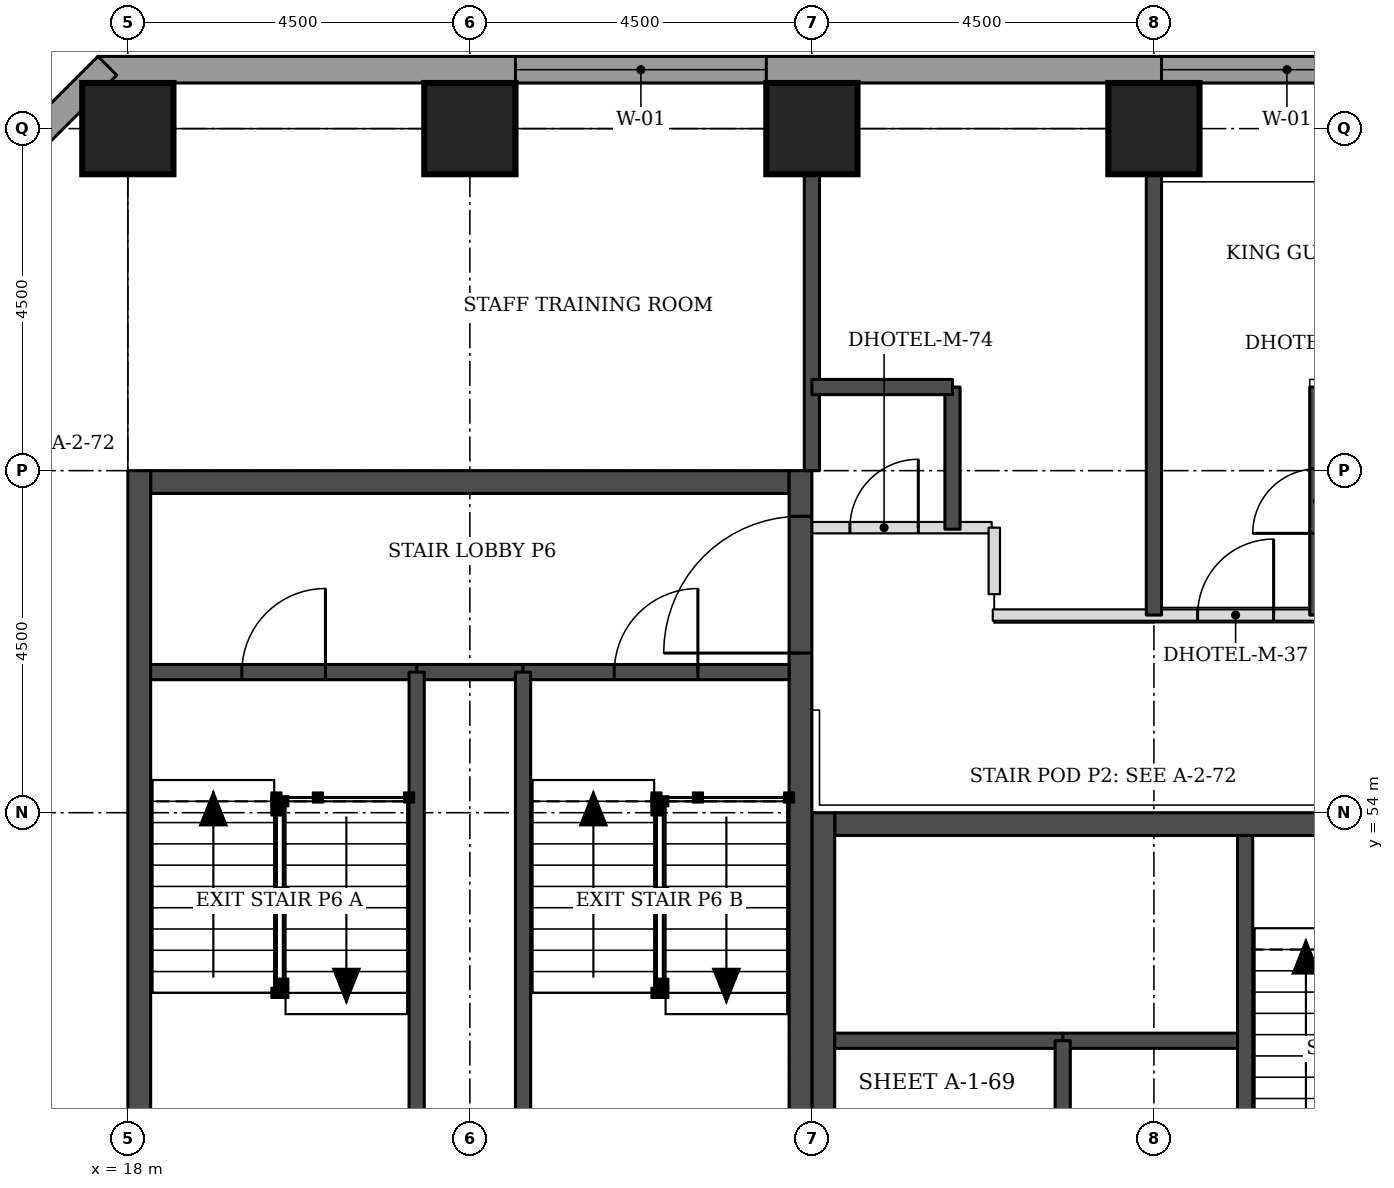
"""IFC4 building model, lengths in metres.
Left out: names, types, materials, properties, quantities, classifications, styles, units other than length and angle.
Written with IfcOpenShell. Run it as: python <this file> out.ifc"""

import sys

from ifc_helpers import new_model, si_unit, direction, frame, frame_2d, origin, origin_2d, place, context, subcontext, project, spatial, rectangle, extrude, element, fill, save


model = new_model("IFC4")
c1 = context("Model", 3, precision=1e-05, world=origin(), true_north=direction((0.0, 1.0)))
c2 = subcontext(c1, "Body", "Model", "MODEL_VIEW")
j1 = project(units=[si_unit("LENGTHUNIT", "METRE"), si_unit("PLANEANGLEUNIT", "RADIAN")], contexts=[c1])
p1 = place(None, origin())
s1 = spatial("IfcSite", under=j1, at=p1, CompositionType="ELEMENT")
p2 = place(p1, origin())
s2 = spatial("IfcBuilding", under=s1, at=p2, CompositionType="ELEMENT")
p3 = place(p2, frame((0.0, 0.0, 23.1)))
s3 = spatial("IfcBuildingStorey", under=s2, at=p3, CompositionType="ELEMENT", Elevation=23.1)
for number, where, z_axis, x_axis in (
    (1, (18.0, 63.0, 0.0), (0.0, 0.0, 1.0), (1.0, 0.0, 0.0)),
    (2, (22.5, 63.0, 0.0), (0.0, 0.0, 1.0), (1.0, 0.0, 0.0)),
    (3, (27.0, 63.0, 0.0), (0.0, 0.0, 1.0), (1.0, 0.0, 0.0)),
    (4, (31.5, 63.0, 0.0), (0.0, 0.0, 1.0), (1.0, 0.0, 0.0)),
):
    element("IfcColumn", number, at=place(p3, frame(where, z_axis=z_axis, x_axis=x_axis)), inside=s3, PredefinedType="COLUMN", context=c2, shape_type="SweptSolid", body=[
        extrude(rectangle(XDim=1.2, YDim=1.2, at=origin_2d()), origin(), (0.0, 0.0, 1.0), 3.3),
    ])
p4 = place(p3, frame((27.3, 53.85, 0.0), z_axis=(0.0, 0.0, 1.0), x_axis=(1.0, 0.0, 0.0)))
e5 = element("IfcWall", 5, at=p4, inside=s3, PredefinedType="SHEAR", context=c2, shape_type="SweptSolid", body=[
    extrude(rectangle(XDim=8.4, YDim=0.3, at=frame_2d((4.2, 0.0))), origin(), (0.0, 0.0, 1.0), 3.3),
])
p5 = place(p4, frame((6.4, 0.0, 0.0)))
e6 = element("IfcOpeningElement", 6, at=p5, cuts=e5, PredefinedType="OPENING", context=c2, shape_type="SweptSolid", body=[
    extrude(rectangle(XDim=1.1, YDim=2.1, at=frame_2d((0.55, 1.05))), frame((0.0, 0.16, 0.0), z_axis=(0.0, -1.0, 0.0), x_axis=(1.0, 0.0, 0.0)), (0.0, 0.0, 1.0), 0.32),
])
p6 = place(p3, frame((27.15, 45.0, 0.0), z_axis=(0.0, 0.0, 1.0), x_axis=(0.0, 1.0, 0.0)))
e7 = element("IfcWall", 7, at=p6, inside=s3, PredefinedType="SHEAR", context=c2, shape_type="SweptSolid", body=[
    extrude(rectangle(XDim=9.0, YDim=0.3, at=frame_2d((4.5, 0.0))), origin(), (0.0, 0.0, 1.0), 3.3),
])
p7 = place(p6, frame((0.4, 0.0, 0.0)))
e8 = element("IfcOpeningElement", 8, at=p7, cuts=e7, PredefinedType="OPENING", context=c2, shape_type="SweptSolid", body=[
    extrude(rectangle(XDim=1.1, YDim=2.1, at=frame_2d((0.55, 1.05))), frame((0.0, 0.16, 0.0), z_axis=(0.0, -1.0, 0.0), x_axis=(1.0, 0.0, 0.0)), (0.0, 0.0, 1.0), 0.32),
])
p8 = place(p3, frame((18.3, 58.35, 0.0), z_axis=(0.0, 0.0, 1.0), x_axis=(1.0, 0.0, 0.0)))
e9 = element("IfcWall", 9, at=p8, inside=s3, PredefinedType="SHEAR", context=c2, shape_type="SweptSolid", body=[
    extrude(rectangle(XDim=8.4, YDim=0.3, at=frame_2d((4.2, 0.0))), origin(), (0.0, 0.0, 1.0), 3.3),
])
p9 = place(p3, frame((18.15, 49.5, 0.0), z_axis=(0.0, 0.0, 1.0), x_axis=(0.0, 1.0, 0.0)))
e10 = element("IfcWall", 10, at=p9, inside=s3, PredefinedType="SHEAR", context=c2, shape_type="SweptSolid", body=[
    extrude(rectangle(XDim=9.0, YDim=0.3, at=frame_2d((4.5, 0.0))), origin(), (0.0, 0.0, 1.0), 3.3),
])
p10 = place(p3, frame((26.85, 49.5, 0.0), z_axis=(0.0, 0.0, 1.0), x_axis=(0.0, 1.0, 0.0)))
e11 = element("IfcWall", 11, at=p10, inside=s3, PredefinedType="SHEAR", context=c2, shape_type="SweptSolid", body=[
    extrude(rectangle(XDim=9.0, YDim=0.3, at=frame_2d((4.5, 0.0))), origin(), (0.0, 0.0, 1.0), 3.3),
])
p11 = place(p10, frame((6.6, 0.0, 0.0)))
e12 = element("IfcOpeningElement", 12, at=p11, cuts=e11, PredefinedType="OPENING", context=c2, shape_type="SweptSolid", body=[
    extrude(rectangle(XDim=1.8, YDim=2.1, at=frame_2d((0.9, 1.05))), frame((0.0, 0.16, 0.0), z_axis=(0.0, -1.0, 0.0), x_axis=(1.0, 0.0, 0.0)), (0.0, 0.0, 1.0), 0.32),
])
p12 = place(p3, frame((35.4, 63.775, 0.0), z_axis=(0.0, 0.0, 1.0), x_axis=(-1.0, 0.0, 0.0)))
e13 = element("IfcWall", 13, at=p12, inside=s3, PredefinedType="STANDARD", context=c2, shape_type="SweptSolid", body=[
    extrude(rectangle(XDim=17.793, YDim=0.35, at=frame_2d((8.897, 0.0))), origin(), (0.0, 0.0, 1.0), 3.055),
])
p13 = place(p12, frame((0.5, 0.0, 0.8)))
e14 = element("IfcOpeningElement", 14, at=p13, cuts=e13, PredefinedType="OPENING", context=c2, shape_type="SweptSolid", body=[
    extrude(rectangle(XDim=3.3, YDim=1.5, at=frame_2d((1.65, 0.75))), frame((0.0, 0.185, 0.0), z_axis=(0.0, -1.0, 0.0), x_axis=(1.0, 0.0, 0.0)), (0.0, 0.0, 1.0), 0.37),
])
p14 = place(p12, frame((9.0, 0.0, 0.8)))
e15 = element("IfcOpeningElement", 15, at=p14, cuts=e13, PredefinedType="OPENING", context=c2, shape_type="SweptSolid", body=[
    extrude(rectangle(XDim=3.3, YDim=1.5, at=frame_2d((1.65, 0.75))), frame((0.0, 0.185, 0.0), z_axis=(0.0, -1.0, 0.0), x_axis=(1.0, 0.0, 0.0)), (0.0, 0.0, 1.0), 0.37),
])
p15 = place(p3, frame((17.73, 63.826, 0.0), z_axis=(0.0, 0.0, 1.0), x_axis=(-0.707106781187, -0.707106781187, 0.0)))
e16 = element("IfcWall", 16, at=p15, inside=s3, PredefinedType="STANDARD", context=c2, shape_type="SweptSolid", body=[
    extrude(rectangle(XDim=7.151, YDim=0.35, at=frame_2d((3.576, 0.0))), origin(), (0.0, 0.0, 1.0), 3.055),
])
p16 = place(p15, frame((1.926, 0.0, 0.8)))
e17 = element("IfcOpeningElement", 17, at=p16, cuts=e16, PredefinedType="OPENING", context=c2, shape_type="SweptSolid", body=[
    extrude(rectangle(XDim=3.3, YDim=1.5, at=frame_2d((1.65, 0.75))), frame((0.0, 0.185, 0.0), z_axis=(0.0, -1.0, 0.0), x_axis=(1.0, 0.0, 0.0)), (0.0, 0.0, 1.0), 0.37),
])
p17 = place(p3, frame((29.38, 56.6, 0.0), z_axis=(0.0, 0.0, 1.0), x_axis=(1.0, 0.0, 0.0)))
e18 = element("IfcWall", 18, at=p17, inside=s3, PredefinedType="PARTITIONING", context=c2, shape_type="SweptSolid", body=[
    extrude(rectangle(XDim=13.62, YDim=0.15, at=frame_2d((6.81, 0.0))), origin(), (0.0, 0.0, 1.0), 3.08),
])
p18 = place(p17, frame((2.695, 0.0, 0.0)))
e19 = element("IfcOpeningElement", 19, at=p18, cuts=e18, PredefinedType="OPENING", context=c2, shape_type="SweptSolid", body=[
    extrude(rectangle(XDim=1.0, YDim=2.1, at=frame_2d((0.5, 1.05))), frame((0.0, 0.085, 0.0), z_axis=(0.0, -1.0, 0.0), x_axis=(1.0, 0.0, 0.0)), (0.0, 0.0, 1.0), 0.17),
])
p19 = place(p17, frame((9.67, 0.0, 0.0)))
e20 = element("IfcOpeningElement", 20, at=p19, cuts=e18, PredefinedType="OPENING", context=c2, shape_type="SweptSolid", body=[
    extrude(rectangle(XDim=0.9, YDim=2.1, at=frame_2d((0.45, 1.05))), frame((0.0, 0.085, 0.0), z_axis=(0.0, -1.0, 0.0), x_axis=(1.0, 0.0, 0.0)), (0.0, 0.0, 1.0), 0.17),
])
p20 = place(p3, frame((27.0, 58.5, 0.0), z_axis=(0.0, 0.0, 1.0), x_axis=(0.0, 1.0, 0.0)))
e21 = element("IfcWall", 21, at=p20, inside=s3, PredefinedType="SOLIDWALL", context=c2, shape_type="SweptSolid", body=[
    extrude(rectangle(XDim=3.9, YDim=0.2, at=frame_2d((1.95, 0.0))), origin(), (0.0, 0.0, 1.0), 3.08),
])
p21 = place(p3, frame((28.85, 57.73, 0.0), z_axis=(0.0, 0.0, 1.0), x_axis=(0.0, 1.0, 0.0)))
e22 = element("IfcWall", 22, at=p21, inside=s3, PredefinedType="SOLIDWALL", context=c2, shape_type="SweptSolid", body=[
    extrude(rectangle(XDim=1.87, YDim=0.2, at=frame_2d((0.935, 0.0))), origin(), (0.0, 0.0, 1.0), 3.08),
])
p22 = place(p3, frame((31.5, 56.6, 0.0), z_axis=(0.0, 0.0, 1.0), x_axis=(0.0, 1.0, 0.0)))
e23 = element("IfcWall", 23, at=p22, inside=s3, PredefinedType="SOLIDWALL", context=c2, shape_type="SweptSolid", body=[
    extrude(rectangle(XDim=5.8, YDim=0.2, at=frame_2d((2.9, 0.0))), origin(), (0.0, 0.0, 1.0), 3.08),
])
p23 = place(p3, frame((33.65, 56.6, 0.0), z_axis=(0.0, 0.0, 1.0), x_axis=(0.0, 1.0, 0.0)))
e24 = element("IfcWall", 24, at=p23, inside=s3, PredefinedType="SOLIDWALL", context=c2, shape_type="SweptSolid", body=[
    extrude(rectangle(XDim=3.0, YDim=0.2, at=frame_2d((1.5, 0.0))), origin(), (0.0, 0.0, 1.0), 3.08),
])
p24 = place(p23, frame((1.075, 0.0, 0.0)))
e25 = element("IfcOpeningElement", 25, at=p24, cuts=e24, PredefinedType="OPENING", context=c2, shape_type="SweptSolid", body=[
    extrude(rectangle(XDim=0.85, YDim=2.1, at=frame_2d((0.425, 1.05))), frame((0.0, 0.11, 0.0), z_axis=(0.0, -1.0, 0.0), x_axis=(1.0, 0.0, 0.0)), (0.0, 0.0, 1.0), 0.22),
])
p25 = place(p3, frame((27.0, 59.6, 0.0), z_axis=(0.0, 0.0, 1.0), x_axis=(1.0, 0.0, 0.0)))
e26 = element("IfcWall", 26, at=p25, inside=s3, PredefinedType="SOLIDWALL", context=c2, shape_type="SweptSolid", body=[
    extrude(rectangle(XDim=1.85, YDim=0.2, at=frame_2d((0.925, 0.0))), origin(), (0.0, 0.0, 1.0), 3.08),
])
p26 = place(p3, frame((27.0, 57.75, 0.0), z_axis=(0.0, 0.0, 1.0), x_axis=(1.0, 0.0, 0.0)))
e27 = element("IfcWall", 27, at=p26, inside=s3, PredefinedType="PARTITIONING", context=c2, shape_type="SweptSolid", body=[
    extrude(rectangle(XDim=2.365, YDim=0.15, at=frame_2d((1.183, 0.0))), origin(), (0.0, 0.0, 1.0), 3.08),
])
p27 = place(p26, frame((0.5, 0.0, 0.0)))
e28 = element("IfcOpeningElement", 28, at=p27, cuts=e27, PredefinedType="OPENING", context=c2, shape_type="SweptSolid", body=[
    extrude(rectangle(XDim=0.9, YDim=2.1, at=frame_2d((0.45, 1.05))), frame((0.0, 0.085, 0.0), z_axis=(0.0, -1.0, 0.0), x_axis=(1.0, 0.0, 0.0)), (0.0, 0.0, 1.0), 0.17),
])
p28 = place(p3, frame((29.4, 57.75, 0.0), z_axis=(0.0, 0.0, 1.0), x_axis=(0.0, -1.0, 0.0)))
e29 = element("IfcWall", 29, at=p28, inside=s3, PredefinedType="PARTITIONING", context=c2, shape_type="SweptSolid", body=[
    extrude(rectangle(XDim=0.875, YDim=0.15, at=frame_2d((0.438, 0.0))), origin(), (0.0, 0.0, 1.0), 3.08),
])
p29 = place(p3, frame((30.3, 51.0, 0.0), z_axis=(0.0, 0.0, 1.0), x_axis=(1.0, 0.0, 0.0)))
e30 = element("IfcWall", 30, at=p29, inside=s3, PredefinedType="SOLIDWALL", context=c2, shape_type="SweptSolid", body=[
    extrude(rectangle(XDim=2.4, YDim=0.2, at=frame_2d((1.2, 0.0))), origin(), (0.0, 0.0, 1.0), 3.3),
])
p30 = place(p3, frame((27.3, 51.0, 0.0), z_axis=(0.0, 0.0, 1.0), x_axis=(1.0, 0.0, 0.0)))
e31 = element("IfcWall", 31, at=p30, inside=s3, PredefinedType="SOLIDWALL", context=c2, shape_type="SweptSolid", body=[
    extrude(rectangle(XDim=3.0, YDim=0.2, at=frame_2d((1.5, 0.0))), origin(), (0.0, 0.0, 1.0), 3.08),
])
for number, where, z_axis, x_axis in (
    (32, (30.3, 45.3, 0.0), (0.0, 0.0, 1.0), (0.0, 1.0, 0.0)),
    (33, (32.7, 48.0, 0.0), (0.0, 0.0, 1.0), (0.0, 1.0, 0.0)),
):
    element("IfcWall", number, at=place(p3, frame(where, z_axis=z_axis, x_axis=x_axis)), inside=s3, PredefinedType="SOLIDWALL", context=c2, shape_type="SweptSolid", body=[
        extrude(rectangle(XDim=5.7, YDim=0.2, at=frame_2d((2.85, 0.0))), origin(), (0.0, 0.0, 1.0), 3.08),
    ])
p31 = place(p3, frame((21.8, 55.85, 0.0), z_axis=(0.0, 0.0, 1.0), x_axis=(1.0, 0.0, 0.0)))
e34 = element("IfcWall", 34, at=p31, inside=s3, PredefinedType="SOLIDWALL", context=c2, shape_type="SweptSolid", body=[
    extrude(rectangle(XDim=1.4, YDim=0.2, at=frame_2d((0.7, 0.0))), origin(), (0.0, 0.0, 1.0), 3.08),
])
p32 = place(p3, frame((18.3, 55.85, 0.0), z_axis=(0.0, 0.0, 1.0), x_axis=(1.0, 0.0, 0.0)))
e35 = element("IfcWall", 35, at=p32, inside=s3, PredefinedType="SOLIDWALL", context=c2, shape_type="SweptSolid", body=[
    extrude(rectangle(XDim=3.5, YDim=0.2, at=frame_2d((1.75, 0.0))), origin(), (0.0, 0.0, 1.0), 3.08),
])
p33 = place(p32, frame((1.2, 0.0, 0.0)))
e36 = element("IfcOpeningElement", 36, at=p33, cuts=e35, PredefinedType="OPENING", context=c2, shape_type="SweptSolid", body=[
    extrude(rectangle(XDim=1.1, YDim=2.1, at=frame_2d((0.55, 1.05))), frame((0.0, 0.11, 0.0), z_axis=(0.0, -1.0, 0.0), x_axis=(1.0, 0.0, 0.0)), (0.0, 0.0, 1.0), 0.22),
])
p34 = place(p3, frame((23.2, 55.85, 0.0), z_axis=(0.0, 0.0, 1.0), x_axis=(1.0, 0.0, 0.0)))
e37 = element("IfcWall", 37, at=p34, inside=s3, PredefinedType="SOLIDWALL", context=c2, shape_type="SweptSolid", body=[
    extrude(rectangle(XDim=3.5, YDim=0.2, at=frame_2d((1.75, 0.0))), origin(), (0.0, 0.0, 1.0), 3.08),
])
p35 = place(p34, frame((1.2, 0.0, 0.0)))
e38 = element("IfcOpeningElement", 38, at=p35, cuts=e37, PredefinedType="OPENING", context=c2, shape_type="SweptSolid", body=[
    extrude(rectangle(XDim=1.1, YDim=2.1, at=frame_2d((0.55, 1.05))), frame((0.0, 0.11, 0.0), z_axis=(0.0, -1.0, 0.0), x_axis=(1.0, 0.0, 0.0)), (0.0, 0.0, 1.0), 0.22),
])
for number, where, z_axis, x_axis in (
    (39, (21.8, 49.8, 0.0), (0.0, 0.0, 1.0), (0.0, 1.0, 0.0)),
    (40, (23.2, 49.8, 0.0), (0.0, 0.0, 1.0), (0.0, 1.0, 0.0)),
):
    element("IfcWall", number, at=place(p3, frame(where, z_axis=z_axis, x_axis=x_axis)), inside=s3, PredefinedType="SOLIDWALL", context=c2, shape_type="SweptSolid", body=[
        extrude(rectangle(XDim=6.05, YDim=0.2, at=frame_2d((3.025, 0.0))), origin(), (0.0, 0.0, 1.0), 3.08),
    ])
p36 = place(p13, origin())
e41 = element("IfcWindow", 41, at=p36, inside=s3, PartitioningType="SINGLE_PANEL", PredefinedType="WINDOW", context=c2, shape_type="SweptSolid", body=[
    extrude(rectangle(XDim=3.3, YDim=1.5, at=frame_2d((1.65, 0.75))), frame((0.0, 0.085, 0.0), z_axis=(0.0, -1.0, 0.0), x_axis=(1.0, 0.0, 0.0)), (0.0, 0.0, 1.0), 0.06),
])
fill(e14, e41)
p37 = place(p14, origin())
e42 = element("IfcWindow", 42, at=p37, inside=s3, PartitioningType="SINGLE_PANEL", PredefinedType="WINDOW", context=c2, shape_type="SweptSolid", body=[
    extrude(rectangle(XDim=3.3, YDim=1.5, at=frame_2d((1.65, 0.75))), frame((0.0, 0.085, 0.0), z_axis=(0.0, -1.0, 0.0), x_axis=(1.0, 0.0, 0.0)), (0.0, 0.0, 1.0), 0.06),
])
fill(e15, e42)
p38 = place(p18, origin())
e43 = element("IfcDoor", 43, at=p38, inside=s3, OperationType="SINGLE_SWING_RIGHT", PredefinedType="DOOR", context=c2, shape_type="SweptSolid", body=[
    extrude(rectangle(XDim=1.0, YDim=2.1, at=frame_2d((0.5, 1.05))), frame((0.0, 0.025, 0.0), z_axis=(0.0, -1.0, 0.0), x_axis=(1.0, 0.0, 0.0)), (0.0, 0.0, 1.0), 0.05),
])
fill(e19, e43)
p39 = place(p27, origin())
e44 = element("IfcDoor", 44, at=p39, inside=s3, OperationType="SINGLE_SWING_RIGHT", PredefinedType="DOOR", context=c2, shape_type="SweptSolid", body=[
    extrude(rectangle(XDim=0.9, YDim=2.1, at=frame_2d((0.45, 1.05))), frame((0.0, 0.025, 0.0), z_axis=(0.0, -1.0, 0.0), x_axis=(1.0, 0.0, 0.0)), (0.0, 0.0, 1.0), 0.05),
])
fill(e28, e44)
p40 = place(p33, origin())
e45 = element("IfcDoor", 45, at=p40, inside=s3, OperationType="SINGLE_SWING_RIGHT", PredefinedType="DOOR", context=c2, shape_type="SweptSolid", body=[
    extrude(rectangle(XDim=1.1, YDim=2.1, at=frame_2d((0.55, 1.05))), frame((0.0, 0.025, 0.0), z_axis=(0.0, -1.0, 0.0), x_axis=(1.0, 0.0, 0.0)), (0.0, 0.0, 1.0), 0.05),
])
fill(e36, e45)
p41 = place(p35, origin())
e46 = element("IfcDoor", 46, at=p41, inside=s3, OperationType="SINGLE_SWING_RIGHT", PredefinedType="DOOR", context=c2, shape_type="SweptSolid", body=[
    extrude(rectangle(XDim=1.1, YDim=2.1, at=frame_2d((0.55, 1.05))), frame((0.0, 0.025, 0.0), z_axis=(0.0, -1.0, 0.0), x_axis=(1.0, 0.0, 0.0)), (0.0, 0.0, 1.0), 0.05),
])
fill(e38, e46)
p42 = place(p11, origin())
e47 = element("IfcDoor", 47, at=p42, inside=s3, OperationType="SINGLE_SWING_LEFT", PredefinedType="DOOR", context=c2, shape_type="SweptSolid", body=[
    extrude(rectangle(XDim=1.8, YDim=2.1, at=frame_2d((0.9, 1.05))), frame((0.0, 0.025, 0.0), z_axis=(0.0, -1.0, 0.0), x_axis=(1.0, 0.0, 0.0)), (0.0, 0.0, 1.0), 0.05),
])
fill(e12, e47)
save(model, sys.argv[1])
